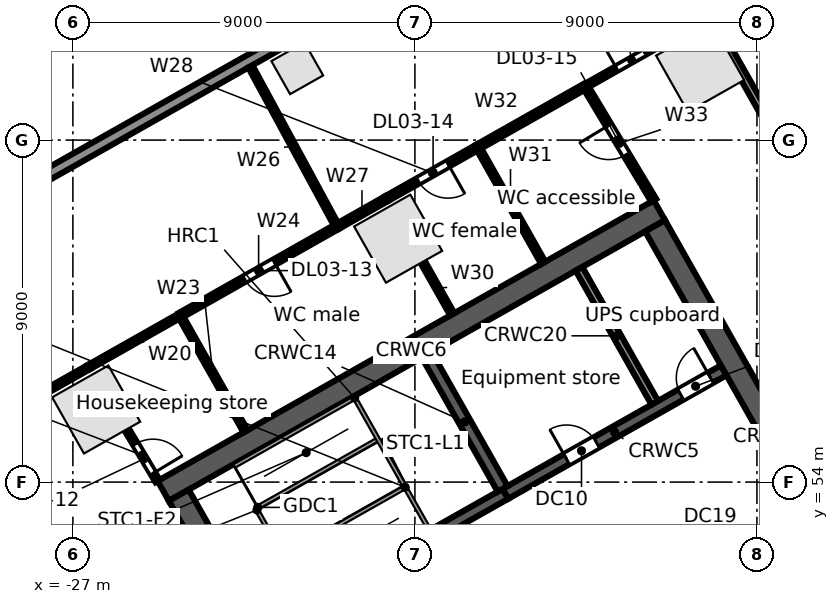
"""IFC4 building model, lengths in metres.
Left out: names, types, materials, properties, quantities, classifications, styles, units other than length and angle.
Written with IfcOpenShell. Run it as: python <this file> out.ifc"""

import sys

from ifc_helpers import new_model, si_unit, direction, frame, frame_2d, origin, origin_2d, place, context, subcontext, project, spatial, rectangle, extrude, element, fill, save


model = new_model("IFC4")
c1 = context("Model", 3, precision=1e-05, world=origin(), true_north=direction((0.0, 1.0)))
c2 = subcontext(c1, "Body", "Model", "MODEL_VIEW")
j1 = project(units=[si_unit("LENGTHUNIT", "METRE"), si_unit("PLANEANGLEUNIT", "RADIAN")], contexts=[c1])
p1 = place(None, origin())
s1 = spatial("IfcSite", under=j1, at=p1, CompositionType="ELEMENT")
p2 = place(p1, origin())
s2 = spatial("IfcBuilding", under=s1, at=p2, CompositionType="ELEMENT")
p3 = place(p2, frame((0.0, 0.0, 21.5)))
s3 = spatial("IfcBuildingStorey", under=s2, at=p3, CompositionType="ELEMENT", Elevation=21.5)
for number, where, z_axis, x_axis in (
    (1, (-10.495, 64.902, 0.0), (0.0, 0.0, 1.0), (-0.87, -0.492, 0.0)),
    (2, (-18.441, 60.406, 0.0), (0.0, 0.0, 1.0), (-0.87, -0.492, 0.0)),
    (3, (-26.388, 55.91, 0.0), (0.0, 0.0, 1.0), (-0.87, -0.492, 0.0)),
):
    element("IfcColumn", number, at=place(p3, frame(where, z_axis=z_axis, x_axis=x_axis)), inside=s3, PredefinedType="COLUMN", context=c2, shape_type="SweptSolid", body=[
        extrude(rectangle(XDim=1.7, YDim=1.7, at=origin_2d()), origin(), (0.0, 0.0, 1.0), 5.0),
    ])
p4 = place(p3, frame((-21.096, 64.89, 0.0), z_axis=(0.0, 0.0, 1.0), x_axis=(-0.87035569594, -0.492423560103, 0.0)))
e4 = element("IfcColumn", 4, at=p4, inside=s3, PredefinedType="COLUMN", context=c2, shape_type="SweptSolid", body=[
    extrude(rectangle(XDim=1.0, YDim=1.0, at=origin_2d()), origin(), (0.0, 0.0, 1.0), 4.68),
])
p5 = place(p3, frame((-63.707, 41.701, 0.0), z_axis=(0.0, 0.0, 1.0), x_axis=(0.870355510268, 0.492423888277, 0.0)))
e5 = element("IfcWall", 5, at=p5, inside=s3, PredefinedType="STANDARD", context=c2, shape_type="SweptSolid", body=[
    extrude(rectangle(XDim=67.903, YDim=0.3, at=frame_2d((33.952, 0.0))), origin(), (0.0, 0.0, 1.0), 4.68),
])
p6 = place(p3, frame((-13.365, 49.911, 0.0), z_axis=(0.0, 0.0, 1.0), x_axis=(0.870340995471, 0.49244954219, 0.0)))
e6 = element("IfcWall", 6, at=p6, inside=s3, PredefinedType="SOLIDWALL", context=c2, shape_type="SweptSolid", body=[
    extrude(rectangle(XDim=6.5, YDim=0.3, at=frame_2d((3.25, 0.0))), origin(), (0.0, 0.0, 1.0), 4.68),
])
p7 = place(p6, frame((0.75, 0.0, 0.0)))
e7 = element("IfcOpeningElement", 7, at=p7, cuts=e6, PredefinedType="OPENING", context=c2, shape_type="SweptSolid", body=[
    extrude(rectangle(XDim=0.9, YDim=2.1, at=frame_2d((0.45, 1.05))), frame((0.0, 0.16, 0.0), z_axis=(0.0, -1.0, 0.0), x_axis=(1.0, 0.0, 0.0)), (0.0, 0.0, 1.0), 0.32),
])
p8 = place(p6, frame((3.15, 0.0, 0.0)))
e8 = element("IfcOpeningElement", 8, at=p8, cuts=e6, PredefinedType="OPENING", context=c2, shape_type="SweptSolid", body=[
    extrude(rectangle(XDim=0.9, YDim=2.1, at=frame_2d((0.45, 1.05))), frame((0.0, 0.16, 0.0), z_axis=(0.0, -1.0, 0.0), x_axis=(1.0, 0.0, 0.0)), (0.0, 0.0, 1.0), 0.32),
])
p9 = place(p6, frame((5.35, 0.0, 0.0)))
e9 = element("IfcOpeningElement", 9, at=p9, cuts=e6, PredefinedType="OPENING", context=c2, shape_type="SweptSolid", body=[
    extrude(rectangle(XDim=0.9, YDim=2.1, at=frame_2d((0.45, 1.05))), frame((0.0, 0.16, 0.0), z_axis=(0.0, -1.0, 0.0), x_axis=(1.0, 0.0, 0.0)), (0.0, 0.0, 1.0), 0.32),
])
p10 = place(p3, frame((-21.885, 50.146, 0.0), z_axis=(0.0, 0.0, 1.0), x_axis=(0.870359411463, 0.492416992881, 0.0)))
e10 = element("IfcWall", 10, at=p10, inside=s3, PredefinedType="SOLIDWALL", context=c2, shape_type="SweptSolid", body=[
    extrude(rectangle(XDim=7.2, YDim=0.3, at=frame_2d((3.6, 0.0))), origin(), (0.0, 0.0, 1.0), 4.68),
])
p11 = place(p10, frame((0.2, 0.0, 0.0)))
e11 = element("IfcOpeningElement", 11, at=p11, cuts=e10, PredefinedType="OPENING", context=c2, shape_type="SweptSolid", body=[
    extrude(rectangle(XDim=1.0, YDim=2.1, at=frame_2d((0.5, 1.05))), frame((0.0, 0.16, 0.0), z_axis=(0.0, -1.0, 0.0), x_axis=(1.0, 0.0, 0.0)), (0.0, 0.0, 1.0), 0.32),
])
p12 = place(p3, frame((-15.618, 53.691, 0.0), z_axis=(0.0, 0.0, 1.0), x_axis=(0.870356769198, 0.492421663121, 0.0)))
e12 = element("IfcWall", 12, at=p12, inside=s3, PredefinedType="SOLIDWALL", context=c2, shape_type="SweptSolid", body=[
    extrude(rectangle(XDim=6.6, YDim=0.3, at=frame_2d((3.3, 0.0))), origin(), (0.0, 0.0, 1.0), 4.68),
])
p13 = place(p12, frame((1.85, 0.0, 0.0)))
e13 = element("IfcOpeningElement", 13, at=p13, cuts=e12, PredefinedType="OPENING", context=c2, shape_type="SweptSolid", body=[
    extrude(rectangle(XDim=0.9, YDim=2.1, at=frame_2d((0.45, 1.05))), frame((0.0, 0.16, 0.0), z_axis=(0.0, -1.0, 0.0), x_axis=(1.0, 0.0, 0.0)), (0.0, 0.0, 1.0), 0.32),
])
p14 = place(p12, frame((5.3, 0.0, 0.0)))
e14 = element("IfcOpeningElement", 14, at=p14, cuts=e12, PredefinedType="OPENING", context=c2, shape_type="SweptSolid", body=[
    extrude(rectangle(XDim=0.9, YDim=2.1, at=frame_2d((0.45, 1.05))), frame((0.0, 0.16, 0.0), z_axis=(0.0, -1.0, 0.0), x_axis=(1.0, 0.0, 0.0)), (0.0, 0.0, 1.0), 0.32),
])
p15 = place(p3, frame((-24.623, 53.767, 0.0), z_axis=(0.0, 0.0, 1.0), x_axis=(0.870356627484, 0.492421913601, 0.0)))
e15 = element("IfcWall", 15, at=p15, inside=s3, PredefinedType="SOLIDWALL", context=c2, shape_type="SweptSolid", body=[
    extrude(rectangle(XDim=15.0, YDim=0.6, at=frame_2d((7.5, 0.0))), origin(), (0.0, 0.0, 1.0), 4.68),
])
p16 = place(p3, frame((-24.214, 53.654, 0.0), z_axis=(0.0, 0.0, 1.0), x_axis=(0.492441221355, -0.870345703448, 0.0)))
e16 = element("IfcWall", 16, at=p16, inside=s3, PredefinedType="SOLIDWALL", context=c2, shape_type="SweptSolid", body=[
    extrude(rectangle(XDim=12.8, YDim=0.6, at=frame_2d((6.4, 0.0))), origin(), (0.0, 0.0, 1.0), 4.68),
])
p17 = place(p3, frame((-17.686, 57.347, 0.0), z_axis=(0.0, 0.0, 1.0), x_axis=(0.492420746998, -0.870357287513, 0.0)))
e17 = element("IfcWall", 17, at=p17, inside=s3, PredefinedType="SOLIDWALL", context=c2, shape_type="SweptSolid", body=[
    extrude(rectangle(XDim=4.05, YDim=0.3, at=frame_2d((2.025, 0.0))), origin(), (0.0, 0.0, 1.0), 4.68),
])
p18 = place(p3, frame((-13.683, 59.612, 0.0), z_axis=(0.0, 0.0, 1.0), x_axis=(0.49241474071, -0.870360685654, 0.0)))
e18 = element("IfcWall", 18, at=p18, inside=s3, PredefinedType="PARTITIONING", context=c2, shape_type="SweptSolid", body=[
    extrude(rectangle(XDim=4.05, YDim=0.2, at=frame_2d((2.025, 0.0))), origin(), (0.0, 0.0, 1.0), 4.68),
])
p19 = place(p3, frame((-11.681, 60.744, 0.0), z_axis=(0.0, 0.0, 1.0), x_axis=(0.492426772896, -0.870353878221, 0.0)))
e19 = element("IfcWall", 19, at=p19, inside=s3, PredefinedType="SOLIDWALL", context=c2, shape_type="SweptSolid", body=[
    extrude(rectangle(XDim=12.8, YDim=0.6, at=frame_2d((6.4, 0.0))), origin(), (0.0, 0.0, 1.0), 4.68),
])
p20 = place(p3, frame((-33.536, 53.09, 0.0), z_axis=(0.0, 0.0, 1.0), x_axis=(0.870327439455, 0.492473499928, 0.0)))
e20 = element("IfcWall", 20, at=p20, inside=s3, PredefinedType="PARTITIONING", context=c2, shape_type="SweptSolid", body=[
    extrude(rectangle(XDim=8.0, YDim=0.125, at=frame_2d((4.0, 0.0))), origin(), (0.0, 0.0, 1.0), 3.742),
])
p21 = place(p20, frame((3.45, 0.0, 0.0)))
e21 = element("IfcOpeningElement", 21, at=p21, cuts=e20, PredefinedType="OPENING", context=c2, shape_type="SweptSolid", body=[
    extrude(rectangle(XDim=0.9, YDim=2.1, at=frame_2d((0.45, 1.05))), frame((0.0, 0.073, 0.0), z_axis=(0.0, -1.0, 0.0), x_axis=(1.0, 0.0, 0.0)), (0.0, 0.0, 1.0), 0.145),
])
p22 = place(p3, frame((-26.573, 57.03, 0.0), z_axis=(0.0, 0.0, 1.0), x_axis=(0.870344460795, 0.492443417626, 0.0)))
e22 = element("IfcWall", 22, at=p22, inside=s3, PredefinedType="PARTITIONING", context=c2, shape_type="SweptSolid", body=[
    extrude(rectangle(XDim=2.75, YDim=0.125, at=frame_2d((1.375, 0.0))), origin(), (0.0, 0.0, 1.0), 4.68),
])
p23 = place(p3, frame((-25.587, 55.387, 0.0), z_axis=(0.0, 0.0, 1.0), x_axis=(0.514767546849, -0.857329792268, 0.0)))
e23 = element("IfcWall", 23, at=p23, inside=s3, PredefinedType="PARTITIONING", context=c2, shape_type="SweptSolid", body=[
    extrude(rectangle(XDim=1.585, YDim=0.125, at=frame_2d((0.792, 0.0))), origin(), (0.0, 0.0, 1.0), 4.68),
])
p24 = place(p23, frame((0.45, 0.0, 0.0)))
e24 = element("IfcOpeningElement", 24, at=p24, cuts=e23, PredefinedType="OPENING", context=c2, shape_type="SweptSolid", body=[
    extrude(rectangle(XDim=0.9, YDim=2.1, at=frame_2d((0.45, 1.05))), frame((0.0, 0.073, 0.0), z_axis=(0.0, -1.0, 0.0), x_axis=(1.0, 0.0, 0.0)), (0.0, 0.0, 1.0), 0.145),
])
p25 = place(p3, frame((-24.18, 58.384, 0.0), z_axis=(0.0, 0.0, 1.0), x_axis=(0.492521469645, -0.870300294116, 0.0)))
e25 = element("IfcWall", 25, at=p25, inside=s3, PredefinedType="PARTITIONING", context=c2, shape_type="SweptSolid", body=[
    extrude(rectangle(XDim=3.5, YDim=0.125, at=frame_2d((1.75, 0.0))), origin(), (0.0, 0.0, 1.0), 3.96),
])
p26 = place(p3, frame((-24.18, 58.384, 0.0), z_axis=(0.0, 0.0, 1.0), x_axis=(0.870360772617, 0.492414587, 0.0)))
e26 = element("IfcWall", 26, at=p26, inside=s3, PredefinedType="PARTITIONING", context=c2, shape_type="SweptSolid", body=[
    extrude(rectangle(XDim=4.75, YDim=0.15, at=frame_2d((2.375, 0.0))), origin(), (0.0, 0.0, 1.0), 4.68),
])
p27 = place(p26, frame((1.95, 0.0, 0.0)))
e27 = element("IfcOpeningElement", 27, at=p27, cuts=e26, PredefinedType="OPENING", context=c2, shape_type="SweptSolid", body=[
    extrude(rectangle(XDim=0.9, YDim=2.1, at=frame_2d((0.45, 1.05))), frame((0.0, 0.085, 0.0), z_axis=(0.0, -1.0, 0.0), x_axis=(1.0, 0.0, 0.0)), (0.0, 0.0, 1.0), 0.17),
])
p28 = place(p3, frame((-22.33, 64.939, 0.0), z_axis=(0.0, 0.0, 1.0), x_axis=(0.476360236723, -0.879250206067, 0.0)))
e28 = element("IfcWall", 28, at=p28, inside=s3, PredefinedType="PARTITIONING", context=c2, shape_type="SweptSolid", body=[
    extrude(rectangle(XDim=4.795, YDim=0.125, at=frame_2d((2.397, 0.0))), origin(), (0.0, 0.0, 1.0), 3.96),
])
p29 = place(p3, frame((-20.046, 60.723, 0.0), z_axis=(0.0, 0.0, 1.0), x_axis=(0.870308175411, 0.492507542899, 0.0)))
e29 = element("IfcWall", 29, at=p29, inside=s3, PredefinedType="PARTITIONING", context=c2, shape_type="SweptSolid", body=[
    extrude(rectangle(XDim=1.5, YDim=0.15, at=frame_2d((0.75, 0.0))), origin(), (0.0, 0.0, 1.0), 3.952),
])
p30 = place(p3, frame((-18.74, 61.462, 0.0), z_axis=(0.0, 0.0, 1.0), x_axis=(0.870430549821, 0.492291232848, 0.0)))
e30 = element("IfcWall", 30, at=p30, inside=s3, PredefinedType="PARTITIONING", context=c2, shape_type="SweptSolid", body=[
    extrude(rectangle(XDim=2.75, YDim=0.15, at=frame_2d((1.375, 0.0))), origin(), (0.0, 0.0, 1.0), 4.68),
])
p31 = place(p30, frame((0.95, 0.0, 0.0)))
e31 = element("IfcOpeningElement", 31, at=p31, cuts=e30, PredefinedType="OPENING", context=c2, shape_type="SweptSolid", body=[
    extrude(rectangle(XDim=0.9, YDim=2.1, at=frame_2d((0.45, 1.05))), frame((0.0, 0.085, 0.0), z_axis=(0.0, -1.0, 0.0), x_axis=(1.0, 0.0, 0.0)), (0.0, 0.0, 1.0), 0.17),
])
p32 = place(p3, frame((-17.797, 59.794, 0.0), z_axis=(0.0, 0.0, 1.0), x_axis=(0.492366981934, -0.870387703901, 0.0)))
e32 = element("IfcWall", 32, at=p32, inside=s3, PredefinedType="PARTITIONING", context=c2, shape_type="SweptSolid", body=[
    extrude(rectangle(XDim=1.584, YDim=0.125, at=frame_2d((0.792, 0.0))), origin(), (0.0, 0.0, 1.0), 4.68),
])
p33 = place(p3, frame((-16.346, 62.816, 0.0), z_axis=(0.0, 0.0, 1.0), x_axis=(0.492220429283, -0.870470590541, 0.0)))
e33 = element("IfcWall", 33, at=p33, inside=s3, PredefinedType="PARTITIONING", context=c2, shape_type="SweptSolid", body=[
    extrude(rectangle(XDim=3.5, YDim=0.125, at=frame_2d((1.75, 0.0))), origin(), (0.0, 0.0, 1.0), 3.96),
])
p34 = place(p3, frame((-16.346, 62.816, 0.0), z_axis=(0.0, 0.0, 1.0), x_axis=(0.870334637055, 0.492460779699, 0.0)))
e34 = element("IfcWall", 34, at=p34, inside=s3, PredefinedType="PARTITIONING", context=c2, shape_type="SweptSolid", body=[
    extrude(rectangle(XDim=3.249, YDim=0.15, at=frame_2d((1.625, 0.0))), origin(), (0.0, 0.0, 1.0), 4.68),
])
p35 = place(p3, frame((-13.518, 64.416, 0.0), z_axis=(0.0, 0.0, 1.0), x_axis=(0.514875058642, -0.857265229663, 0.0)))
e35 = element("IfcWall", 35, at=p35, inside=s3, PredefinedType="PARTITIONING", context=c2, shape_type="SweptSolid", body=[
    extrude(rectangle(XDim=3.502, YDim=0.15, at=frame_2d((1.751, 0.0))), origin(), (0.0, 0.0, 1.0), 3.96),
])
p36 = place(p35, frame((1.2, 0.0, 0.0)))
e36 = element("IfcOpeningElement", 36, at=p36, cuts=e35, PredefinedType="OPENING", context=c2, shape_type="SweptSolid", body=[
    extrude(rectangle(XDim=0.9, YDim=2.1, at=frame_2d((0.45, 1.05))), frame((0.0, 0.085, 0.0), z_axis=(0.0, -1.0, 0.0), x_axis=(1.0, 0.0, 0.0)), (0.0, 0.0, 1.0), 0.17),
])
p37 = place(p3, frame((-13.518, 64.416, 0.0), z_axis=(0.0, 0.0, 1.0), x_axis=(0.870338454914, 0.492454032268, 0.0)))
e37 = element("IfcWall", 37, at=p37, inside=s3, PredefinedType="PARTITIONING", context=c2, shape_type="SweptSolid", body=[
    extrude(rectangle(XDim=3.75, YDim=0.125, at=frame_2d((1.875, 0.0))), origin(), (0.0, 0.0, 1.0), 3.742),
])
p38 = place(p37, frame((0.95, 0.0, 0.0)))
e38 = element("IfcOpeningElement", 38, at=p38, cuts=e37, PredefinedType="OPENING", context=c2, shape_type="SweptSolid", body=[
    extrude(rectangle(XDim=0.9, YDim=2.1, at=frame_2d((0.45, 1.05))), frame((0.0, 0.073, 0.0), z_axis=(0.0, -1.0, 0.0), x_axis=(1.0, 0.0, 0.0)), (0.0, 0.0, 1.0), 0.145),
])
p39 = place(p3, frame((-10.254, 66.263, 0.0), z_axis=(0.0, 0.0, 1.0), x_axis=(0.492411664329, -0.870362426138, 0.0)))
e39 = element("IfcWall", 39, at=p39, inside=s3, PredefinedType="PARTITIONING", context=c2, shape_type="SweptSolid", body=[
    extrude(rectangle(XDim=17.0, YDim=0.2, at=frame_2d((8.5, 0.0))), origin(), (0.0, 0.0, 1.0), 3.742),
])
p40 = place(p39, frame((7.7, 0.0, 0.0)))
e40 = element("IfcOpeningElement", 40, at=p40, cuts=e39, PredefinedType="OPENING", context=c2, shape_type="SweptSolid", body=[
    extrude(rectangle(XDim=1.8, YDim=2.1, at=frame_2d((0.9, 1.05))), frame((0.0, 0.11, 0.0), z_axis=(0.0, -1.0, 0.0), x_axis=(1.0, 0.0, 0.0)), (0.0, 0.0, 1.0), 0.22),
])
p41 = place(p13, origin())
e41 = element("IfcDoor", 41, at=p41, inside=s3, OperationType="SINGLE_SWING_LEFT", PredefinedType="DOOR", context=c2, shape_type="SweptSolid", body=[
    extrude(rectangle(XDim=0.9, YDim=2.1, at=frame_2d((0.45, 1.05))), frame((0.0, 0.025, 0.0), z_axis=(0.0, -1.0, 0.0), x_axis=(1.0, 0.0, 0.0)), (0.0, 0.0, 1.0), 0.05),
])
fill(e13, e41)
p42 = place(p14, origin())
e42 = element("IfcDoor", 42, at=p42, inside=s3, OperationType="SINGLE_SWING_RIGHT", PredefinedType="DOOR", context=c2, shape_type="SweptSolid", body=[
    extrude(rectangle(XDim=0.9, YDim=2.1, at=frame_2d((0.45, 1.05))), frame((0.0, 0.025, 0.0), z_axis=(0.0, -1.0, 0.0), x_axis=(1.0, 0.0, 0.0)), (0.0, 0.0, 1.0), 0.05),
])
fill(e14, e42)
p43 = place(p38, origin())
e43 = element("IfcDoor", 43, at=p43, inside=s3, OperationType="SINGLE_SWING_LEFT", PredefinedType="DOOR", context=c2, shape_type="SweptSolid", body=[
    extrude(rectangle(XDim=0.9, YDim=2.1, at=frame_2d((0.45, 1.05))), frame((0.0, 0.025, 0.0), z_axis=(0.0, -1.0, 0.0), x_axis=(1.0, 0.0, 0.0)), (0.0, 0.0, 1.0), 0.05),
])
fill(e38, e43)
p44 = place(p24, origin())
e44 = element("IfcDoor", 44, at=p44, inside=s3, OperationType="SINGLE_SWING_RIGHT", PredefinedType="DOOR", context=c2, shape_type="SweptSolid", body=[
    extrude(rectangle(XDim=0.9, YDim=2.1, at=frame_2d((0.45, 1.05))), frame((0.0, 0.025, 0.0), z_axis=(0.0, -1.0, 0.0), x_axis=(1.0, 0.0, 0.0)), (0.0, 0.0, 1.0), 0.05),
])
fill(e24, e44)
p45 = place(p27, frame((0.9, 0.0, 0.0), z_axis=(0.0, 0.0, 1.0), x_axis=(-1.0, 0.0, 0.0)))
e45 = element("IfcDoor", 45, at=p45, inside=s3, OperationType="SINGLE_SWING_LEFT", PredefinedType="DOOR", context=c2, shape_type="SweptSolid", body=[
    extrude(rectangle(XDim=0.9, YDim=2.1, at=frame_2d((0.45, 1.05))), frame((0.0, 0.025, 0.0), z_axis=(0.0, -1.0, 0.0), x_axis=(1.0, 0.0, 0.0)), (0.0, 0.0, 1.0), 0.05),
])
fill(e27, e45)
p46 = place(p31, frame((0.9, 0.0, 0.0), z_axis=(0.0, 0.0, 1.0), x_axis=(-1.0, 0.0, 0.0)))
e46 = element("IfcDoor", 46, at=p46, inside=s3, OperationType="SINGLE_SWING_LEFT", PredefinedType="DOOR", context=c2, shape_type="SweptSolid", body=[
    extrude(rectangle(XDim=0.9, YDim=2.1, at=frame_2d((0.45, 1.05))), frame((0.0, 0.025, 0.0), z_axis=(0.0, -1.0, 0.0), x_axis=(1.0, 0.0, 0.0)), (0.0, 0.0, 1.0), 0.05),
])
fill(e31, e46)
p47 = place(p36, frame((0.9, 0.0, 0.0), z_axis=(0.0, 0.0, 1.0), x_axis=(-1.0, 0.0, 0.0)))
e47 = element("IfcDoor", 47, at=p47, inside=s3, OperationType="SINGLE_SWING_RIGHT", PredefinedType="DOOR", context=c2, shape_type="SweptSolid", body=[
    extrude(rectangle(XDim=0.9, YDim=2.1, at=frame_2d((0.45, 1.05))), frame((0.0, 0.025, 0.0), z_axis=(0.0, -1.0, 0.0), x_axis=(1.0, 0.0, 0.0)), (0.0, 0.0, 1.0), 0.05),
])
fill(e36, e47)
save(model, sys.argv[1])
